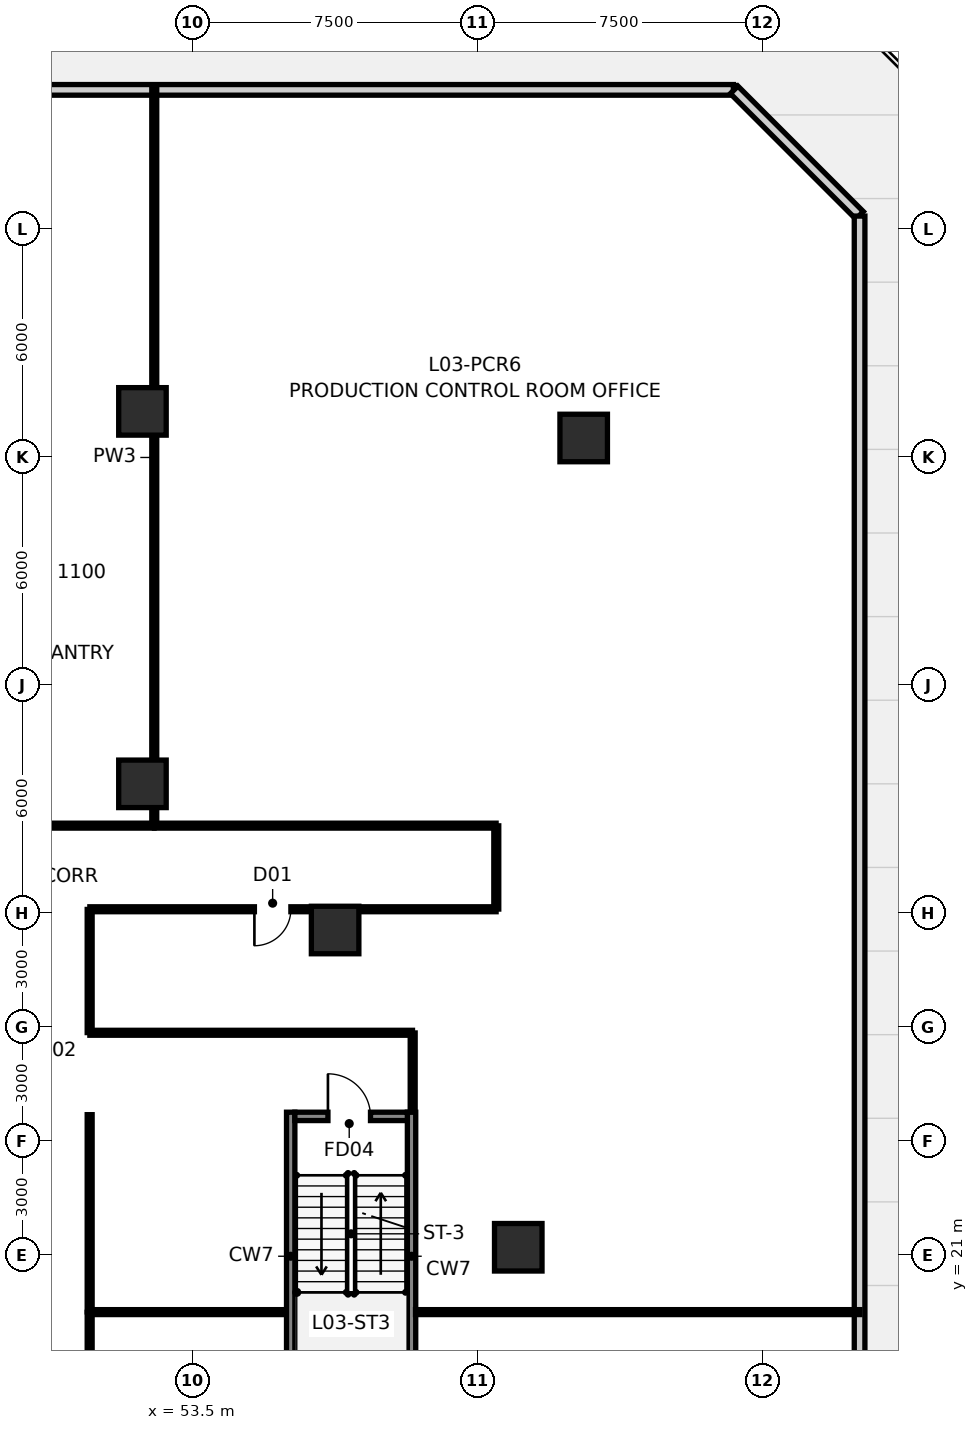
"""IFC4 building model, lengths in metres.
Left out: names, types, materials, properties, quantities, classifications, styles, units other than length and angle.
Written with IfcOpenShell. Run it as: python <this file> out.ifc"""

import sys

from ifc_helpers import new_model, si_unit, direction, frame, frame_2d, origin, origin_2d, place, context, subcontext, project, spatial, rectangle, hollow_rectangle, extrude, source, transform, mapped, element, fill, save


model = new_model("IFC4")
c1 = context("Model", 3, precision=1e-05, world=origin(), true_north=direction((0.0, 1.0)))
c2 = subcontext(c1, "Body", "Model", "MODEL_VIEW")
j1 = project(units=[si_unit("LENGTHUNIT", "METRE"), si_unit("PLANEANGLEUNIT", "RADIAN")], contexts=[c1])
p1 = place(None, origin())
s1 = spatial("IfcSite", under=j1, at=p1, CompositionType="ELEMENT")
p2 = place(p1, origin())
s2 = spatial("IfcBuilding", under=s1, at=p2, CompositionType="ELEMENT")
p3 = place(p2, frame((0.0, 0.0, 14.7)))
s3 = spatial("IfcBuildingStorey", under=s2, at=p3, CompositionType="ELEMENT", Elevation=14.7)
for number, where, z_axis, x_axis in (
    (1, (56.09, 17.18, 0.0), (0.0, 0.0, 1.0), (0.0, 1.0, 0.0)),
    (2, (59.27, 17.18, 0.0), (0.0, 0.0, 1.0), (0.0, 1.0, 0.0)),
):
    element("IfcWall", number, at=place(p3, frame(where, z_axis=z_axis, x_axis=x_axis)), inside=s3, PredefinedType="SHEAR", context=c2, shape_type="SweptSolid", body=[
        extrude(rectangle(XDim=7.58, YDim=0.22, at=frame_2d((3.79, 0.0))), origin(), (0.0, 0.0, 1.0), 4.2),
    ])
p4 = place(p3, frame((56.2, 24.65, 0.0), z_axis=(0.0, 0.0, 1.0), x_axis=(1.0, 0.0, 0.0)))
e3 = element("IfcWall", 3, at=p4, inside=s3, PredefinedType="SHEAR", context=c2, shape_type="SweptSolid", body=[
    extrude(rectangle(XDim=2.96, YDim=0.22, at=frame_2d((1.48, 0.0))), origin(), (0.0, 0.0, 1.0), 4.2),
])
p5 = place(p4, frame((0.87, 0.0, 0.0)))
e4 = element("IfcOpeningElement", 4, at=p5, cuts=e3, PredefinedType="OPENING", context=c2, shape_type="SweptSolid", body=[
    extrude(rectangle(XDim=1.12, YDim=2.15, at=frame_2d((0.56, 1.075))), frame((0.0, 0.122, 0.0), z_axis=(0.0, -1.0, 0.0), x_axis=(1.0, 0.0, 0.0)), (0.0, 0.0, 1.0), 0.244),
])
m1 = source(origin(), c2, "Body", "SweptSolid", [
    extrude(hollow_rectangle(XDim=1.25, YDim=1.25, WallThickness=0.07, at=origin_2d()), origin(), (0.0, 0.0, 1.0), 4.201),
])
p6 = place(p3, frame((62.078, 21.206, 0.0), z_axis=(-0.01040216717, -0.021617911661, 0.999712188989), x_axis=(0.90110684469, -0.433597110752, 0.0)))
e5 = element("IfcColumn", 5, at=p6, inside=s3, PredefinedType="COLUMN", context=c2, shape_type="MappedRepresentation", body=[
    mapped(m1, transform((0.0, 0.0, 0.0), scale=1.0)),
])
m2 = source(origin(), c2, "Body", "SweptSolid", [
    extrude(hollow_rectangle(XDim=1.25, YDim=1.25, WallThickness=0.07, at=origin_2d()), origin(), (0.0, 0.0, 1.0), 4.201),
])
p7 = place(p3, frame((57.259, 29.554, 0.0), z_axis=(-0.014936170945, -0.013773823012, 0.999793574993), x_axis=(0.677923610644, -0.735132354159, 0.0)))
e6 = element("IfcColumn", 6, at=p7, inside=s3, PredefinedType="COLUMN", context=c2, shape_type="MappedRepresentation", body=[
    mapped(m2, transform((0.0, 0.0, 0.0), scale=1.0)),
])
m3 = source(origin(), c2, "Body", "SweptSolid", [
    extrude(hollow_rectangle(XDim=1.25, YDim=1.25, WallThickness=0.07, at=origin_2d()), origin(), (0.0, 0.0, 1.0), 4.2),
])
for number, where, z_axis, x_axis in (
    (7, (52.189, 33.4, 0.0), (0.0, 0.0, 1.0), (1.0, 0.0, 0.0)),
    (8, (52.189, 43.2, 0.0), (0.0, 0.0, 1.0), (1.0, 0.0, 0.0)),
    (9, (63.8, 42.5, 0.0), (0.0, 0.0, 1.0), (1.0, 0.0, 0.0)),
):
    element("IfcColumn", number, at=place(p3, frame(where, z_axis=z_axis, x_axis=x_axis)), inside=s3, PredefinedType="COLUMN", context=c2, shape_type="MappedRepresentation", body=[
        mapped(m3, transform((0.0, 0.0, 0.0), scale=1.0)),
    ])
p8 = place(p3, frame((8.861, 51.66, 0.0), z_axis=(0.0, 0.0, 1.0), x_axis=(1.0, 0.0, 0.0)))
e10 = element("IfcWall", 10, at=p8, inside=s3, PredefinedType="STANDARD", context=c2, shape_type="SweptSolid", body=[
    extrude(rectangle(XDim=58.878, YDim=0.28, at=frame_2d((29.439, 0.0))), origin(), (0.0, 0.0, 1.0), 3.88),
])
p9 = place(p3, frame((67.759, 51.66, 0.0), z_axis=(0.0, 0.0, 1.0), x_axis=(0.707106781187, -0.707106781187, 0.0)))
e11 = element("IfcWall", 11, at=p9, inside=s3, PredefinedType="STANDARD", context=c2, shape_type="SweptSolid", body=[
    extrude(rectangle(XDim=4.668, YDim=0.28, at=frame_2d((2.334, 0.0))), origin(), (0.0, 0.0, 1.0), 3.88),
])
p10 = place(p3, frame((71.06, 48.339, 0.0), z_axis=(0.0, 0.0, 1.0), x_axis=(0.0, -1.0, 0.0)))
e12 = element("IfcWall", 12, at=p10, inside=s3, PredefinedType="STANDARD", context=c2, shape_type="SweptSolid", body=[
    extrude(rectangle(XDim=42.678, YDim=0.28, at=frame_2d((21.339, 0.0))), origin(), (0.0, 0.0, 1.0), 3.88),
])
p11 = place(p3, frame((52.5, 32.305, 0.0), z_axis=(0.0, 0.0, 1.0), x_axis=(0.0, 1.0, 0.0)))
e13 = element("IfcWall", 13, at=p11, inside=s3, PredefinedType="PARTITIONING", context=c2, shape_type="SweptSolid", body=[
    extrude(rectangle(XDim=19.365, YDim=0.13, at=frame_2d((9.683, 0.0))), origin(), (0.0, 0.0, 1.0), 2.865),
])
p12 = place(p3, frame((59.375, 19.5, 0.0), z_axis=(0.0, 0.0, 1.0), x_axis=(1.0, 0.0, 0.0)))
e14 = element("IfcWall", 14, at=p12, inside=s3, PredefinedType="PARTITIONING", context=c2, shape_type="SweptSolid", body=[
    extrude(rectangle(XDim=11.695, YDim=0.13, at=frame_2d((5.848, 0.0))), origin(), (0.0, 0.0, 1.0), 2.865),
])
p13 = place(p3, frame((41.005, 32.3, 0.0), z_axis=(0.0, 0.0, 1.0), x_axis=(1.0, 0.0, 0.0)))
e15 = element("IfcWall", 15, at=p13, inside=s3, PredefinedType="PARTITIONING", context=c2, shape_type="SweptSolid", body=[
    extrude(rectangle(XDim=11.49, YDim=0.13, at=frame_2d((5.745, 0.0))), origin(), (0.0, 0.0, 1.0), 3.88),
])
p14 = place(p13, frame((5.265, 0.0, 0.0)))
e16 = element("IfcOpeningElement", 16, at=p14, cuts=e15, PredefinedType="OPENING", context=c2, shape_type="SweptSolid", body=[
    extrude(rectangle(XDim=0.96, YDim=2.15, at=frame_2d((0.48, 1.075))), frame((0.0, 0.077, 0.0), z_axis=(0.0, -1.0, 0.0), x_axis=(1.0, 0.0, 0.0)), (0.0, 0.0, 1.0), 0.154),
])
p15 = place(p3, frame((61.495, 30.1, 0.0), z_axis=(0.0, 0.0, 1.0), x_axis=(-1.0, 0.0, 0.0)))
e17 = element("IfcWall", 17, at=p15, inside=s3, PredefinedType="PARTITIONING", context=c2, shape_type="SweptSolid", body=[
    extrude(rectangle(XDim=10.69, YDim=0.13, at=frame_2d((5.345, 0.0))), origin(), (0.0, 0.0, 1.0), 3.253),
])
p16 = place(p15, frame((5.4, 0.0, 0.0)))
e18 = element("IfcOpeningElement", 18, at=p16, cuts=e17, PredefinedType="OPENING", context=c2, shape_type="SweptSolid", body=[
    extrude(rectangle(XDim=0.96, YDim=2.15, at=frame_2d((0.48, 1.075))), frame((0.0, 0.077, 0.0), z_axis=(0.0, -1.0, 0.0), x_axis=(1.0, 0.0, 0.0)), (0.0, 0.0, 1.0), 0.154),
])
p17 = place(p3, frame((52.505, 32.3, 0.0), z_axis=(0.0, 0.0, 1.0), x_axis=(1.0, 0.0, 0.0)))
e19 = element("IfcWall", 19, at=p17, inside=s3, PredefinedType="PARTITIONING", context=c2, shape_type="SweptSolid", body=[
    extrude(rectangle(XDim=8.99, YDim=0.13, at=frame_2d((4.495, 0.0))), origin(), (0.0, 0.0, 1.0), 3.88),
])
p18 = place(p3, frame((50.805, 26.85, 0.0), z_axis=(0.0, 0.0, 1.0), x_axis=(1.0, 0.0, 0.0)))
e20 = element("IfcWall", 20, at=p18, inside=s3, PredefinedType="PARTITIONING", context=c2, shape_type="SweptSolid", body=[
    extrude(rectangle(XDim=8.49, YDim=0.13, at=frame_2d((4.245, 0.0))), origin(), (0.0, 0.0, 1.0), 3.88),
])
p19 = place(p3, frame((50.8, 12.205, 0.0), z_axis=(0.0, 0.0, 1.0), x_axis=(0.0, 1.0, 0.0)))
e21 = element("IfcWall", 21, at=p19, inside=s3, PredefinedType="PARTITIONING", context=c2, shape_type="SweptSolid", body=[
    extrude(rectangle(XDim=7.29, YDim=0.13, at=frame_2d((3.645, 0.0))), origin(), (0.0, 0.0, 1.0), 3.88),
])
p20 = place(p19, frame((3.165, 0.0, 0.0)))
e22 = element("IfcOpeningElement", 22, at=p20, cuts=e21, PredefinedType="OPENING", context=c2, shape_type="SweptSolid", body=[
    extrude(rectangle(XDim=0.96, YDim=2.15, at=frame_2d((0.48, 1.075))), frame((0.0, 0.077, 0.0), z_axis=(0.0, -1.0, 0.0), x_axis=(1.0, 0.0, 0.0)), (0.0, 0.0, 1.0), 0.154),
])
p21 = place(p3, frame((50.805, 19.5, 0.0), z_axis=(0.0, 0.0, 1.0), x_axis=(1.0, 0.0, 0.0)))
e23 = element("IfcWall", 23, at=p21, inside=s3, PredefinedType="PARTITIONING", context=c2, shape_type="SweptSolid", body=[
    extrude(rectangle(XDim=5.17, YDim=0.13, at=frame_2d((2.585, 0.0))), origin(), (0.0, 0.0, 1.0), 3.88),
])
p22 = place(p3, frame((50.8, 24.695, 0.0), z_axis=(0.0, 0.0, 1.0), x_axis=(0.0, -1.0, 0.0)))
e24 = element("IfcWall", 24, at=p22, inside=s3, PredefinedType="PARTITIONING", context=c2, shape_type="SweptSolid", body=[
    extrude(rectangle(XDim=5.19, YDim=0.13, at=frame_2d((2.595, 0.0))), origin(), (0.0, 0.0, 1.0), 3.88),
])
p23 = place(p3, frame((50.8, 30.095, 0.0), z_axis=(0.0, 0.0, 1.0), x_axis=(0.0, -1.0, 0.0)))
e25 = element("IfcWall", 25, at=p23, inside=s3, PredefinedType="PARTITIONING", context=c2, shape_type="SweptSolid", body=[
    extrude(rectangle(XDim=3.24, YDim=0.13, at=frame_2d((1.62, 0.0))), origin(), (0.0, 0.0, 1.0), 3.88),
])
p24 = place(p3, frame((61.5, 32.295, 0.0), z_axis=(0.0, 0.0, 1.0), x_axis=(0.0, -1.0, 0.0)))
e26 = element("IfcWall", 26, at=p24, inside=s3, PredefinedType="PARTITIONING", context=c2, shape_type="SweptSolid", body=[
    extrude(rectangle(XDim=2.19, YDim=0.13, at=frame_2d((1.095, 0.0))), origin(), (0.0, 0.0, 1.0), 3.88),
])
p25 = place(p3, frame((59.3, 26.845, 0.0), z_axis=(0.0, 0.0, 1.0), x_axis=(0.0, -1.0, 0.0)))
e27 = element("IfcWall", 27, at=p25, inside=s3, PredefinedType="PARTITIONING", context=c2, shape_type="SweptSolid", body=[
    extrude(rectangle(XDim=2.07, YDim=0.13, at=frame_2d((1.035, 0.0))), origin(), (0.0, 0.0, 1.0), 3.88),
])
p26 = place(p5, origin())
e28 = element("IfcDoor", 28, at=p26, inside=s3, OperationType="SINGLE_SWING_LEFT", PredefinedType="DOOR", context=c2, shape_type="SweptSolid", body=[
    extrude(rectangle(XDim=1.12, YDim=2.15, at=frame_2d((0.56, 1.075))), frame((0.0, 0.025, 0.0), z_axis=(0.0, -1.0, 0.0), x_axis=(1.0, 0.0, 0.0)), (0.0, 0.0, 1.0), 0.05),
])
fill(e4, e28)
p27 = place(p16, origin())
e29 = element("IfcDoor", 29, at=p27, inside=s3, OperationType="SINGLE_SWING_RIGHT", PredefinedType="DOOR", context=c2, shape_type="SweptSolid", body=[
    extrude(rectangle(XDim=0.96, YDim=2.15, at=frame_2d((0.48, 1.075))), frame((0.0, 0.025, 0.0), z_axis=(0.0, -1.0, 0.0), x_axis=(1.0, 0.0, 0.0)), (0.0, 0.0, 1.0), 0.05),
])
fill(e18, e29)
save(model, sys.argv[1])
